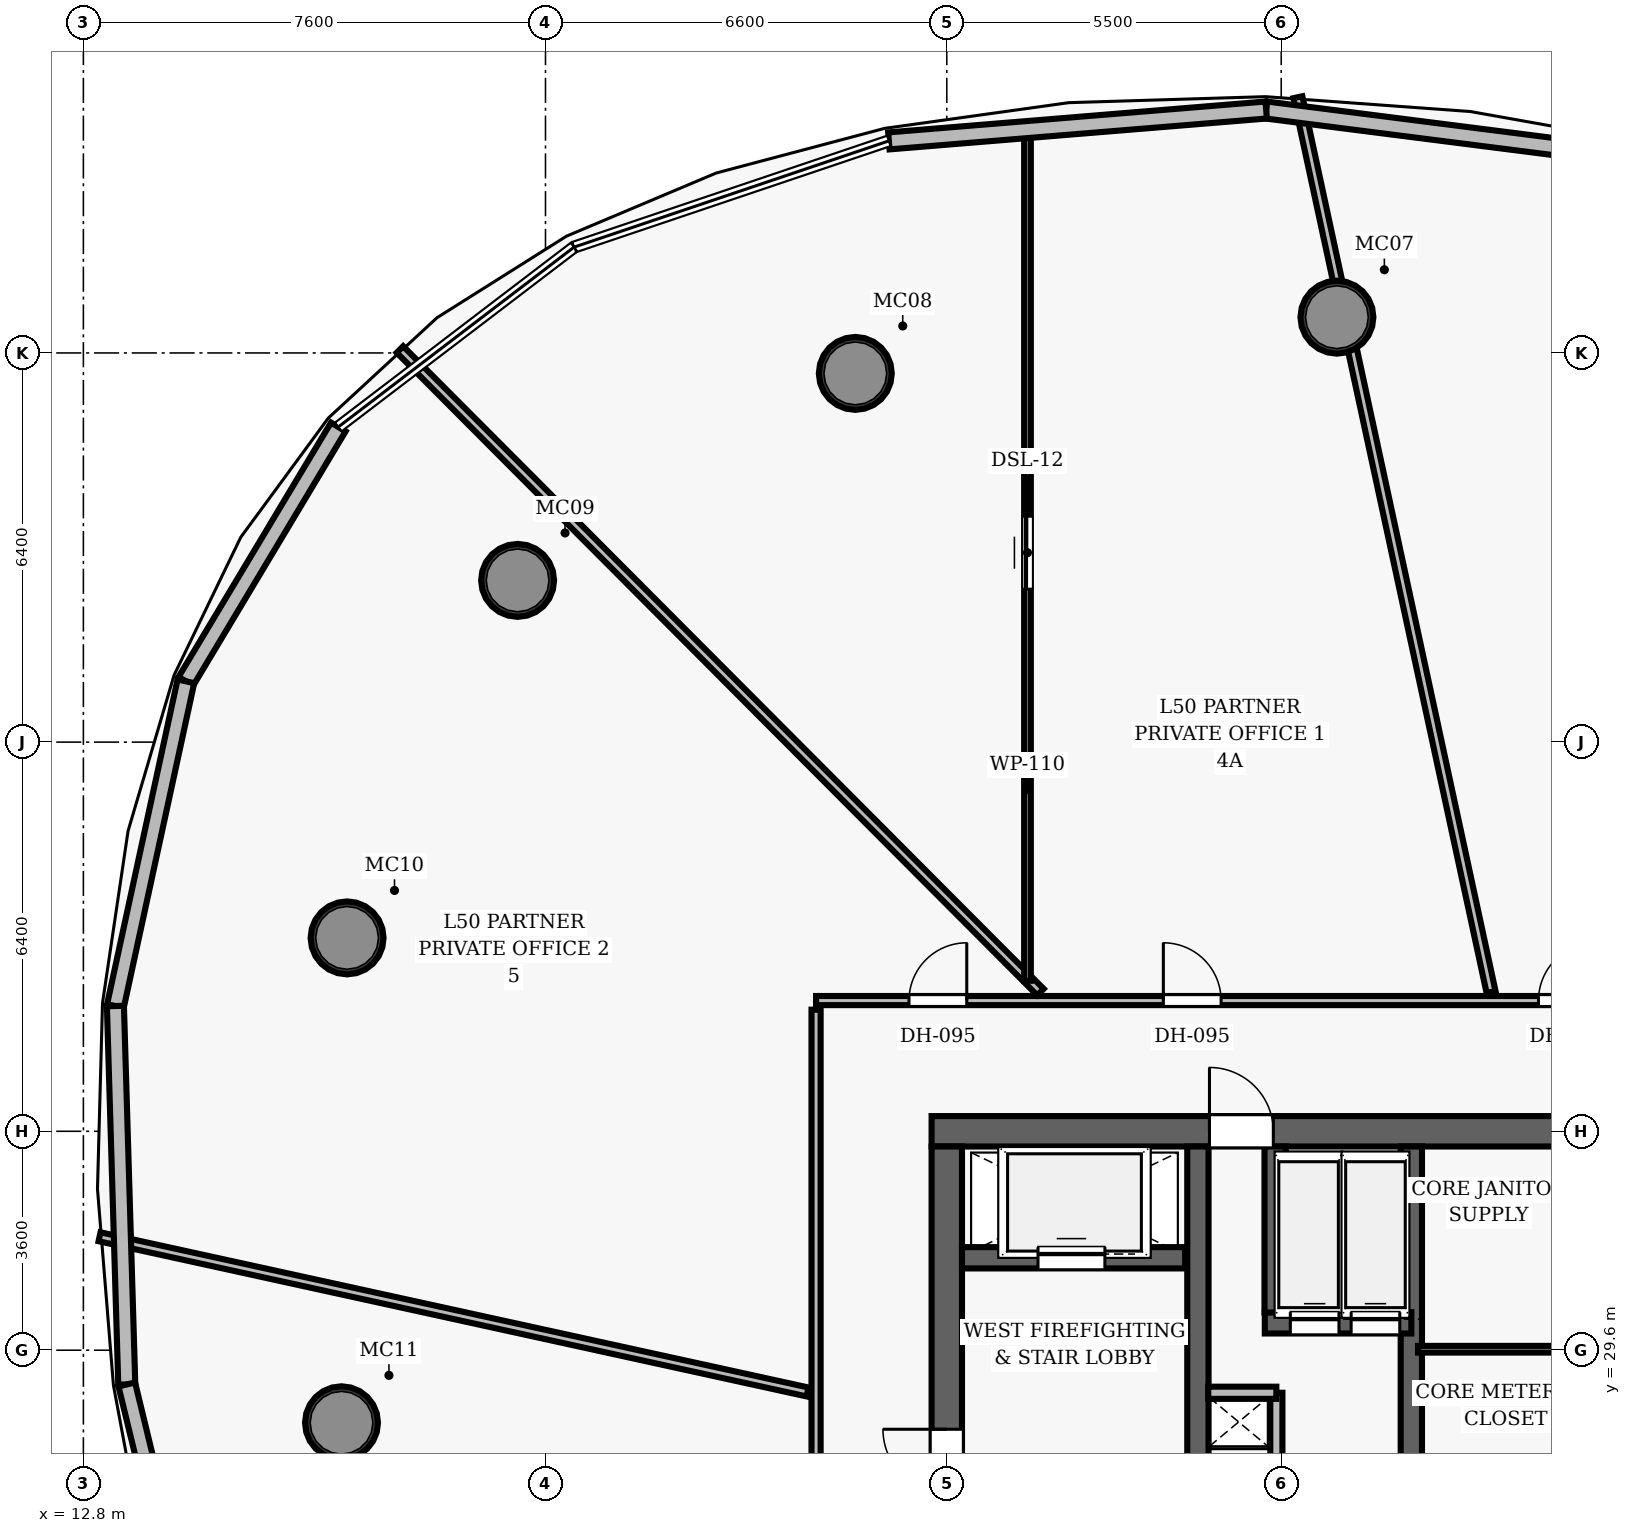
"""IFC4 building model, lengths in metres.
Left out: names, types, materials, properties, quantities, classifications, styles, units other than length and angle.
Written with IfcOpenShell. Run it as: python <this file> out.ifc"""

import sys

from ifc_helpers import new_model, si_unit, direction, frame, frame_2d, origin, origin_2d, place, context, subcontext, project, spatial, rectangle, hollow_circle, extrude, element, fill, save


model = new_model("IFC4")
c1 = context("Model", 3, precision=1e-05, world=origin(), true_north=direction((0.0, 1.0)))
c2 = subcontext(c1, "Body", "Model", "MODEL_VIEW")
j1 = project(units=[si_unit("LENGTHUNIT", "METRE"), si_unit("PLANEANGLEUNIT", "RADIAN")], contexts=[c1])
p1 = place(None, origin())
s1 = spatial("IfcSite", under=j1, at=p1, CompositionType="ELEMENT")
p2 = place(p1, origin())
s2 = spatial("IfcBuilding", under=s1, at=p2, CompositionType="ELEMENT")
p3 = place(p2, frame((0.0, 0.0, 198.15)))
s3 = spatial("IfcBuildingStorey", under=s2, at=p3, CompositionType="ELEMENT", Elevation=198.15)
p4 = place(p3, frame((26.75, 33.2, 0.0), z_axis=(0.0, 0.0, 1.0), x_axis=(1.0, 0.0, 0.0)))
e1 = element("IfcWall", 1, at=p4, inside=s3, PredefinedType="SHEAR", context=c2, shape_type="SweptSolid", body=[
    extrude(rectangle(XDim=22.5, YDim=0.5, at=frame_2d((11.25, 0.0))), origin(), (0.0, 0.0, 1.0), 3.85),
])
p5 = place(p4, frame((4.57, 0.0, 0.0)))
e2 = element("IfcOpeningElement", 2, at=p5, cuts=e1, PredefinedType="OPENING", context=c2, shape_type="SweptSolid", body=[
    extrude(rectangle(XDim=1.05, YDim=2.15, at=frame_2d((0.525, 1.075))), frame((0.0, 0.26, 0.0), z_axis=(0.0, -1.0, 0.0), x_axis=(1.0, 0.0, 0.0)), (0.0, 0.0, 1.0), 0.52),
])
p6 = place(p4, frame((14.47, 0.0, 0.0)))
e3 = element("IfcOpeningElement", 3, at=p6, cuts=e1, PredefinedType="OPENING", context=c2, shape_type="SweptSolid", body=[
    extrude(rectangle(XDim=1.05, YDim=2.15, at=frame_2d((0.525, 1.075))), frame((0.0, 0.26, 0.0), z_axis=(0.0, -1.0, 0.0), x_axis=(1.0, 0.0, 0.0)), (0.0, 0.0, 1.0), 0.52),
])
p7 = place(p3, frame((27.0, 19.05, 0.0), z_axis=(0.0, 0.0, 1.0), x_axis=(0.0, 1.0, 0.0)))
e4 = element("IfcWall", 4, at=p7, inside=s3, PredefinedType="SHEAR", context=c2, shape_type="SweptSolid", body=[
    extrude(rectangle(XDim=13.9, YDim=0.5, at=frame_2d((6.95, 0.0))), origin(), (0.0, 0.0, 1.0), 3.85),
])
p8 = place(p7, frame((8.2, 0.0, 0.0)))
e5 = element("IfcOpeningElement", 5, at=p8, cuts=e4, PredefinedType="OPENING", context=c2, shape_type="SweptSolid", body=[
    extrude(rectangle(XDim=1.05, YDim=2.15, at=frame_2d((0.525, 1.075))), frame((0.0, 0.26, 0.0), z_axis=(0.0, -1.0, 0.0), x_axis=(1.0, 0.0, 0.0)), (0.0, 0.0, 1.0), 0.52),
])
p9 = place(p3, frame((31.13, 19.05, 0.0), z_axis=(0.0, 0.0, 1.0), x_axis=(0.0, 1.0, 0.0)))
e6 = element("IfcWall", 6, at=p9, inside=s3, PredefinedType="SHEAR", context=c2, shape_type="SweptSolid", body=[
    extrude(rectangle(XDim=13.9, YDim=0.35, at=frame_2d((6.95, 0.0))), origin(), (0.0, 0.0, 1.0), 3.85),
])
for number, where, z_axis, x_axis in (
    (7, (33.416, 46.588, 0.0), (0.0, 0.0, 1.0), (1.0, 0.0, 0.0)),
    (8, (25.496, 45.664, 0.0), (0.0, 0.0, 1.0), (1.0, 0.0, 0.0)),
    (9, (19.942, 42.26, 0.0), (0.0, 0.0, 1.0), (1.0, 0.0, 0.0)),
    (10, (17.137, 36.381, 0.0), (0.0, 0.0, 1.0), (1.0, 0.0, 0.0)),
    (11, (17.045, 28.406, 0.0), (0.0, 0.0, 1.0), (1.0, 0.0, 0.0)),
):
    element("IfcColumn", number, at=place(p3, frame(where, z_axis=z_axis, x_axis=x_axis)), inside=s3, PredefinedType="COLUMN", context=c2, shape_type="SweptSolid", body=[
        extrude(hollow_circle(Radius=0.6, WallThickness=0.05, at=origin_2d()), origin(), (0.0, 0.0, 1.0), 3.85),
    ])
p10 = place(p3, frame((27.25, 31.12, 0.0), z_axis=(0.0, 0.0, 1.0), x_axis=(1.0, 0.0, 0.0)))
e12 = element("IfcWall", 12, at=p10, inside=s3, PredefinedType="SHEAR", context=c2, shape_type="SweptSolid", body=[
    extrude(rectangle(XDim=3.67, YDim=0.35, at=frame_2d((1.835, 0.0))), origin(), (0.0, 0.0, 1.0), 3.035),
])
p11 = place(p10, frame((1.25, 0.0, 0.0)))
e13 = element("IfcOpeningElement", 13, at=p11, cuts=e12, PredefinedType="OPENING", context=c2, shape_type="SweptSolid", body=[
    extrude(rectangle(XDim=1.1, YDim=2.15, at=frame_2d((0.55, 1.075))), frame((0.0, 0.185, 0.0), z_axis=(0.0, -1.0, 0.0), x_axis=(1.0, 0.0, 0.0)), (0.0, 0.0, 1.0), 0.37),
])
p12 = place(p3, frame((34.64, 26.69, 0.0), z_axis=(0.0, 0.0, 1.0), x_axis=(0.0, 1.0, 0.0)))
e14 = element("IfcWall", 14, at=p12, inside=s3, PredefinedType="SHEAR", context=c2, shape_type="SweptSolid", body=[
    extrude(rectangle(XDim=6.26, YDim=0.35, at=frame_2d((3.13, 0.0))), origin(), (0.0, 0.0, 1.0), 3.85),
])
p13 = place(p3, frame((32.23, 30.05, 0.0), z_axis=(0.0, 0.0, 1.0), x_axis=(1.0, 0.0, 0.0)))
e15 = element("IfcWall", 15, at=p13, inside=s3, PredefinedType="SHEAR", context=c2, shape_type="SweptSolid", body=[
    extrude(rectangle(XDim=2.41, YDim=0.35, at=frame_2d((1.205, 0.0))), origin(), (0.0, 0.0, 1.0), 3.035),
])
p14 = place(p13, frame((0.42, 0.0, 0.0)))
e16 = element("IfcOpeningElement", 16, at=p14, cuts=e15, PredefinedType="OPENING", context=c2, shape_type="SweptSolid", body=[
    extrude(rectangle(XDim=0.8, YDim=2.15, at=frame_2d((0.4, 1.075))), frame((0.0, 0.185, 0.0), z_axis=(0.0, -1.0, 0.0), x_axis=(1.0, 0.0, 0.0)), (0.0, 0.0, 1.0), 0.37),
])
p15 = place(p13, frame((1.42, 0.0, 0.0)))
e17 = element("IfcOpeningElement", 17, at=p15, cuts=e15, PredefinedType="OPENING", context=c2, shape_type="SweptSolid", body=[
    extrude(rectangle(XDim=0.8, YDim=2.15, at=frame_2d((0.4, 1.075))), frame((0.0, 0.185, 0.0), z_axis=(0.0, -1.0, 0.0), x_axis=(1.0, 0.0, 0.0)), (0.0, 0.0, 1.0), 0.37),
])
p16 = place(p3, frame((32.4, 30.22, 0.0), z_axis=(0.0, 0.0, 1.0), x_axis=(0.0, 1.0, 0.0)))
e18 = element("IfcWall", 18, at=p16, inside=s3, PredefinedType="SHEAR", context=c2, shape_type="SweptSolid", body=[
    extrude(rectangle(XDim=2.73, YDim=0.35, at=frame_2d((1.365, 0.0))), origin(), (0.0, 0.0, 1.0), 3.035),
])
p17 = place(p3, frame((32.42, 26.86, 0.0), z_axis=(0.0, 0.0, 1.0), x_axis=(0.0, 1.0, 0.0)))
e19 = element("IfcWall", 19, at=p17, inside=s3, PredefinedType="PARTITIONING", context=c2, shape_type="SweptSolid", body=[
    extrude(rectangle(XDim=2.04, YDim=0.2, at=frame_2d((1.02, 0.0))), origin(), (0.0, 0.0, 1.0), 3.035),
])
p18 = place(p17, frame((0.14, 0.0, 0.0)))
e20 = element("IfcOpeningElement", 20, at=p18, cuts=e19, PredefinedType="OPENING", context=c2, shape_type="SweptSolid", body=[
    extrude(rectangle(XDim=0.8, YDim=2.05, at=frame_2d((0.4, 1.025))), frame((0.0, 0.11, 0.0), z_axis=(0.0, -1.0, 0.0), x_axis=(1.0, 0.0, 0.0)), (0.0, 0.0, 1.0), 0.22),
])
p19 = place(p3, frame((31.3, 28.9, 0.0), z_axis=(0.0, 0.0, 1.0), x_axis=(1.0, 0.0, 0.0)))
e21 = element("IfcWall", 21, at=p19, inside=s3, PredefinedType="PARTITIONING", context=c2, shape_type="SweptSolid", body=[
    extrude(rectangle(XDim=1.12, YDim=0.2, at=frame_2d((0.56, 0.0))), origin(), (0.0, 0.0, 1.0), 3.035),
])
p20 = place(p3, frame((34.75, 29.616, 0.0), z_axis=(0.0, 0.0, 1.0), x_axis=(1.0, 0.0, 0.0)))
e22 = element("IfcWall", 22, at=p20, inside=s3, PredefinedType="PARTITIONING", context=c2, shape_type="SweptSolid", body=[
    extrude(rectangle(XDim=6.25, YDim=0.11, at=frame_2d((3.125, 0.0))), origin(), (0.0, 0.0, 1.0), 3.035),
])
p21 = place(p3, frame((24.85, 35.35, 0.0), z_axis=(0.0, 0.0, 1.0), x_axis=(1.0, 0.0, 0.0)))
e23 = element("IfcWall", 23, at=p21, inside=s3, PredefinedType="PARTITIONING", context=c2, shape_type="SweptSolid", body=[
    extrude(rectangle(XDim=26.0, YDim=0.15, at=frame_2d((13.0, 0.0))), origin(), (0.0, 0.0, 1.0), 3.035),
])
p22 = place(p21, frame((18.327, 0.0, 0.0)))
e24 = element("IfcOpeningElement", 24, at=p22, cuts=e23, PredefinedType="OPENING", context=c2, shape_type="SweptSolid", body=[
    extrude(rectangle(XDim=0.95, YDim=2.15, at=frame_2d((0.475, 1.075))), frame((0.0, 0.085, 0.0), z_axis=(0.0, -1.0, 0.0), x_axis=(1.0, 0.0, 0.0)), (0.0, 0.0, 1.0), 0.17),
])
p23 = place(p21, frame((11.881, 0.0, 0.0)))
e25 = element("IfcOpeningElement", 25, at=p23, cuts=e23, PredefinedType="OPENING", context=c2, shape_type="SweptSolid", body=[
    extrude(rectangle(XDim=0.95, YDim=2.15, at=frame_2d((0.475, 1.075))), frame((0.0, 0.085, 0.0), z_axis=(0.0, -1.0, 0.0), x_axis=(1.0, 0.0, 0.0)), (0.0, 0.0, 1.0), 0.17),
])
p24 = place(p21, frame((5.711, 0.0, 0.0)))
e26 = element("IfcOpeningElement", 26, at=p24, cuts=e23, PredefinedType="OPENING", context=c2, shape_type="SweptSolid", body=[
    extrude(rectangle(XDim=0.95, YDim=2.15, at=frame_2d((0.475, 1.075))), frame((0.0, 0.085, 0.0), z_axis=(0.0, -1.0, 0.0), x_axis=(1.0, 0.0, 0.0)), (0.0, 0.0, 1.0), 0.17),
])
p25 = place(p21, frame((1.528, 0.0, 0.0)))
e27 = element("IfcOpeningElement", 27, at=p25, cuts=e23, PredefinedType="OPENING", context=c2, shape_type="SweptSolid", body=[
    extrude(rectangle(XDim=0.95, YDim=2.15, at=frame_2d((0.475, 1.075))), frame((0.0, 0.085, 0.0), z_axis=(0.0, -1.0, 0.0), x_axis=(1.0, 0.0, 0.0)), (0.0, 0.0, 1.0), 0.17),
])
p26 = place(p3, frame((24.85, 27.08, 0.0), z_axis=(0.0, 0.0, 1.0), x_axis=(0.0, 1.0, 0.0)))
e28 = element("IfcWall", 28, at=p26, inside=s3, PredefinedType="PARTITIONING", context=c2, shape_type="SweptSolid", body=[
    extrude(rectangle(XDim=8.12, YDim=0.15, at=frame_2d((4.06, 0.0))), origin(), (0.0, 0.0, 1.0), 3.035),
])
p27 = place(p3, frame((35.951, 35.49, 0.0), z_axis=(0.0, 0.0, 1.0), x_axis=(-0.211025031092, 0.977480657738, 0.0)))
e29 = element("IfcWall", 29, at=p27, inside=s3, PredefinedType="PARTITIONING", context=c2, shape_type="SweptSolid", body=[
    extrude(rectangle(XDim=15.055, YDim=0.15, at=frame_2d((7.528, 0.0))), origin(), (0.0, 0.0, 1.0), 3.035),
])
p28 = place(p3, frame((28.54, 35.49, 0.0), z_axis=(0.0, 0.0, 1.0), x_axis=(-0.70598507389, 0.708226711897, 0.0)))
e30 = element("IfcWall", 30, at=p28, inside=s3, PredefinedType="PARTITIONING", context=c2, shape_type="SweptSolid", body=[
    extrude(rectangle(XDim=14.921, YDim=0.15, at=frame_2d((7.46, 0.0))), origin(), (0.0, 0.0, 1.0), 3.035),
])
p29 = place(p3, frame((24.71, 28.913, 0.0), z_axis=(0.0, 0.0, 1.0), x_axis=(-0.976806128217, 0.21412563573, 0.0)))
e31 = element("IfcWall", 31, at=p29, inside=s3, PredefinedType="PARTITIONING", context=c2, shape_type="SweptSolid", body=[
    extrude(rectangle(XDim=11.92, YDim=0.15, at=frame_2d((5.96, 0.0))), origin(), (0.0, 0.0, 1.0), 3.035),
])
p30 = place(p3, frame((28.327, 35.675, 0.0), z_axis=(0.0, 0.0, 1.0), x_axis=(0.0, 1.0, 0.0)))
e32 = element("IfcWall", 32, at=p30, inside=s3, PredefinedType="PARTITIONING", context=c2, shape_type="SweptSolid", body=[
    extrude(rectangle(XDim=14.08, YDim=0.11, at=frame_2d((7.04, 0.0))), origin(), (0.0, 0.0, 1.0), 3.035),
])
p31 = place(p30, frame((6.44, 0.0, 0.0)))
e33 = element("IfcOpeningElement", 33, at=p31, cuts=e32, PredefinedType="OPENING", context=c2, shape_type="SweptSolid", body=[
    extrude(rectangle(XDim=1.2, YDim=2.15, at=frame_2d((0.6, 1.075))), frame((0.0, 0.065, 0.0), z_axis=(0.0, -1.0, 0.0), x_axis=(1.0, 0.0, 0.0)), (0.0, 0.0, 1.0), 0.13),
])
p32 = place(p3, frame((32.253, 49.995, 0.0), z_axis=(0.0, 0.0, 1.0), x_axis=(0.992013801187, -0.126129371102, 0.0)))
e34 = element("IfcWall", 34, at=p32, inside=s3, PredefinedType="SOLIDWALL", context=c2, shape_type="SweptSolid", body=[
    extrude(rectangle(XDim=6.784, YDim=0.28, at=frame_2d((3.392, 0.0))), origin(), (0.0, 0.0, 1.0), 3.62),
])
p33 = place(p3, frame((26.047, 49.487, 0.0), z_axis=(0.0, 0.0, 1.0), x_axis=(0.996668763865, 0.08155596321, 0.0)))
e35 = element("IfcWall", 35, at=p33, inside=s3, PredefinedType="SOLIDWALL", context=c2, shape_type="SweptSolid", body=[
    extrude(rectangle(XDim=6.227, YDim=0.28, at=frame_2d((3.113, 0.0))), origin(), (0.0, 0.0, 1.0), 3.62),
])
p34 = place(p3, frame((14.486, 40.6, 0.0), z_axis=(0.0, 0.0, 1.0), x_axis=(0.514024471223, 0.857775520159, 0.0)))
e36 = element("IfcWall", 36, at=p34, inside=s3, PredefinedType="SOLIDWALL", context=c2, shape_type="SweptSolid", body=[
    extrude(rectangle(XDim=4.876, YDim=0.28, at=frame_2d((2.438, 0.0))), origin(), (0.0, 0.0, 1.0), 3.62),
])
p35 = place(p3, frame((13.327, 35.26, 0.0), z_axis=(0.0, 0.0, 1.0), x_axis=(0.21208833361, 0.977250499486, 0.0)))
e37 = element("IfcWall", 37, at=p35, inside=s3, PredefinedType="SOLIDWALL", context=c2, shape_type="SweptSolid", body=[
    extrude(rectangle(XDim=5.464, YDim=0.28, at=frame_2d((2.732, 0.0))), origin(), (0.0, 0.0, 1.0), 3.62),
])
p36 = place(p3, frame((13.514, 29.036, 0.0), z_axis=(0.0, 0.0, 1.0), x_axis=(-0.030035086117, 0.999548845031, 0.0)))
e38 = element("IfcWall", 38, at=p36, inside=s3, PredefinedType="SOLIDWALL", context=c2, shape_type="SweptSolid", body=[
    extrude(rectangle(XDim=6.227, YDim=0.28, at=frame_2d((3.113, 0.0))), origin(), (0.0, 0.0, 1.0), 3.62),
])
p37 = place(p3, frame((15.115, 22.443, 0.0), z_axis=(0.0, 0.0, 1.0), x_axis=(-0.235917229787, 0.971773152896, 0.0)))
e39 = element("IfcWall", 39, at=p37, inside=s3, PredefinedType="SOLIDWALL", context=c2, shape_type="SweptSolid", body=[
    extrude(rectangle(XDim=6.784, YDim=0.28, at=frame_2d((3.392, 0.0))), origin(), (0.0, 0.0, 1.0), 3.62),
])
p38 = place(p8, origin())
e40 = element("IfcDoor", 40, at=p38, inside=s3, OperationType="SINGLE_SWING_RIGHT", PredefinedType="DOOR", context=c2, shape_type="SweptSolid", body=[
    extrude(rectangle(XDim=1.05, YDim=2.15, at=frame_2d((0.525, 1.075))), frame((0.0, 0.025, 0.0), z_axis=(0.0, -1.0, 0.0), x_axis=(1.0, 0.0, 0.0)), (0.0, 0.0, 1.0), 0.05),
])
fill(e5, e40)
p39 = place(p5, origin())
e41 = element("IfcDoor", 41, at=p39, inside=s3, OperationType="SINGLE_SWING_LEFT", PredefinedType="DOOR", context=c2, shape_type="SweptSolid", body=[
    extrude(rectangle(XDim=1.05, YDim=2.15, at=frame_2d((0.525, 1.075))), frame((0.0, 0.025, 0.0), z_axis=(0.0, -1.0, 0.0), x_axis=(1.0, 0.0, 0.0)), (0.0, 0.0, 1.0), 0.05),
])
fill(e2, e41)
p40 = place(p23, origin())
e42 = element("IfcDoor", 42, at=p40, inside=s3, OperationType="SINGLE_SWING_RIGHT", PredefinedType="DOOR", context=c2, shape_type="SweptSolid", body=[
    extrude(rectangle(XDim=0.95, YDim=2.15, at=frame_2d((0.475, 1.075))), frame((0.0, 0.025, 0.0), z_axis=(0.0, -1.0, 0.0), x_axis=(1.0, 0.0, 0.0)), (0.0, 0.0, 1.0), 0.05),
])
fill(e25, e42)
p41 = place(p24, origin())
e43 = element("IfcDoor", 43, at=p41, inside=s3, OperationType="SINGLE_SWING_LEFT", PredefinedType="DOOR", context=c2, shape_type="SweptSolid", body=[
    extrude(rectangle(XDim=0.95, YDim=2.15, at=frame_2d((0.475, 1.075))), frame((0.0, 0.025, 0.0), z_axis=(0.0, -1.0, 0.0), x_axis=(1.0, 0.0, 0.0)), (0.0, 0.0, 1.0), 0.05),
])
fill(e26, e43)
p42 = place(p31, origin())
e44 = element("IfcDoor", 44, at=p42, inside=s3, OperationType="SLIDING_TO_RIGHT", PredefinedType="DOOR", context=c2, shape_type="SweptSolid", body=[
    extrude(rectangle(XDim=1.2, YDim=2.15, at=frame_2d((0.6, 1.075))), frame((0.0, 0.025, 0.0), z_axis=(0.0, -1.0, 0.0), x_axis=(1.0, 0.0, 0.0)), (0.0, 0.0, 1.0), 0.05),
])
fill(e33, e44)
p43 = place(p25, origin())
e45 = element("IfcDoor", 45, at=p43, inside=s3, OperationType="SINGLE_SWING_RIGHT", PredefinedType="DOOR", context=c2, shape_type="SweptSolid", body=[
    extrude(rectangle(XDim=0.95, YDim=2.15, at=frame_2d((0.475, 1.075))), frame((0.0, 0.025, 0.0), z_axis=(0.0, -1.0, 0.0), x_axis=(1.0, 0.0, 0.0)), (0.0, 0.0, 1.0), 0.05),
])
fill(e27, e45)
p44 = place(p11, origin())
e46 = element("IfcDoor", 46, at=p44, inside=s3, OperationType="SLIDING_TO_LEFT", PredefinedType="DOOR", context=c2, shape_type="SweptSolid", body=[
    extrude(rectangle(XDim=1.1, YDim=2.15, at=frame_2d((0.55, 1.075))), frame((0.0, 0.025, 0.0), z_axis=(0.0, -1.0, 0.0), x_axis=(1.0, 0.0, 0.0)), (0.0, 0.0, 1.0), 0.05),
])
fill(e13, e46)
p45 = place(p14, origin())
e47 = element("IfcDoor", 47, at=p45, inside=s3, OperationType="SLIDING_TO_LEFT", PredefinedType="DOOR", context=c2, shape_type="SweptSolid", body=[
    extrude(rectangle(XDim=0.8, YDim=2.15, at=frame_2d((0.4, 1.075))), frame((0.0, 0.025, 0.0), z_axis=(0.0, -1.0, 0.0), x_axis=(1.0, 0.0, 0.0)), (0.0, 0.0, 1.0), 0.05),
])
fill(e16, e47)
p46 = place(p15, origin())
e48 = element("IfcDoor", 48, at=p46, inside=s3, OperationType="SLIDING_TO_LEFT", PredefinedType="DOOR", context=c2, shape_type="SweptSolid", body=[
    extrude(rectangle(XDim=0.8, YDim=2.15, at=frame_2d((0.4, 1.075))), frame((0.0, 0.025, 0.0), z_axis=(0.0, -1.0, 0.0), x_axis=(1.0, 0.0, 0.0)), (0.0, 0.0, 1.0), 0.05),
])
fill(e17, e48)
save(model, sys.argv[1])
